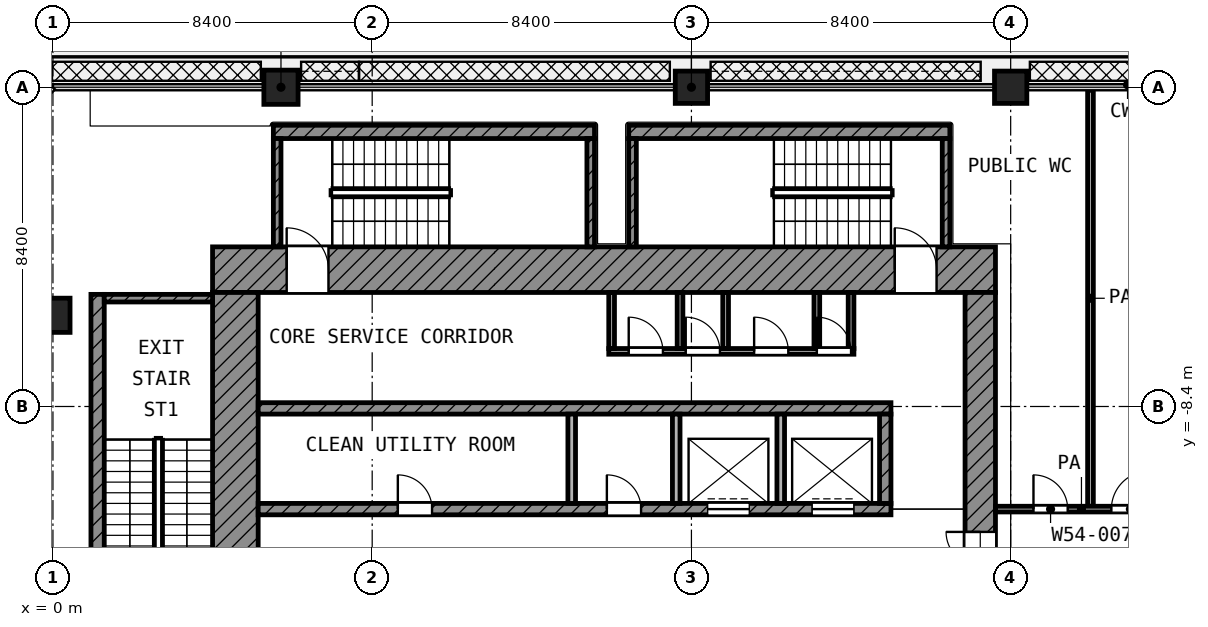
"""IFC4 building model, lengths in metres.
Left out: names, types, materials, properties, quantities, classifications, styles, units other than length and angle.
Written with IfcOpenShell. Run it as: python <this file> out.ifc"""

import sys

from ifc_helpers import new_model, si_unit, direction, frame, frame_2d, origin, origin_2d, place, context, subcontext, project, spatial, rectangle, extrude, element, fill, save


model = new_model("IFC4")
c1 = context("Model", 3, precision=1e-05, world=origin(), true_north=direction((0.0, 1.0)))
c2 = subcontext(c1, "Body", "Model", "MODEL_VIEW")
j1 = project(units=[si_unit("LENGTHUNIT", "METRE"), si_unit("PLANEANGLEUNIT", "RADIAN")], contexts=[c1])
p1 = place(None, origin())
s1 = spatial("IfcSite", under=j1, at=p1, CompositionType="ELEMENT")
p2 = place(p1, origin())
s2 = spatial("IfcBuilding", under=s1, at=p2, CompositionType="ELEMENT")
p3 = place(p2, frame((0.0, 0.0, 255.8)))
s3 = spatial("IfcBuildingStorey", under=s2, at=p3, CompositionType="ELEMENT", Elevation=255.8)
p4 = place(p3, frame((6.0, 0.0, 0.0), z_axis=(0.0, 0.0, 1.0), x_axis=(1.0, 0.0, 0.0)))
e1 = element("IfcColumn", 1, at=p4, inside=s3, PredefinedType="COLUMN", context=c2, shape_type="SweptSolid", body=[
    extrude(rectangle(XDim=0.9, YDim=0.9, at=origin_2d()), origin(), (0.0, 0.0, 1.0), 4.2),
])
for number, where, z_axis, x_axis in (
    (2, (16.8, 0.0, 0.0), (0.0, 0.0, 1.0), (1.0, 0.0, 0.0)),
    (3, (25.2, 0.0, 0.0), (0.0, 0.0, 1.0), (1.0, 0.0, 0.0)),
):
    element("IfcColumn", number, at=place(p3, frame(where, z_axis=z_axis, x_axis=x_axis)), inside=s3, PredefinedType="COLUMN", context=c2, shape_type="SweptSolid", body=[
        extrude(rectangle(XDim=0.85, YDim=0.85, at=origin_2d()), origin(), (0.0, 0.0, 1.0), 4.2),
    ])
p5 = place(p3, frame((0.0, -6.0, 0.0), z_axis=(0.0, 0.0, 1.0), x_axis=(1.0, 0.0, 0.0)))
e4 = element("IfcColumn", 4, at=p5, inside=s3, PredefinedType="COLUMN", context=c2, shape_type="SweptSolid", body=[
    extrude(rectangle(XDim=0.9, YDim=0.9, at=origin_2d()), origin(), (0.0, 0.0, 1.0), 4.2),
])
p6 = place(p3, frame((4.2, -4.8, 0.0), z_axis=(0.0, 0.0, 1.0), x_axis=(1.0, 0.0, 0.0)))
e5 = element("IfcWall", 5, at=p6, inside=s3, PredefinedType="SHEAR", context=c2, shape_type="SweptSolid", body=[
    extrude(rectangle(XDim=20.6, YDim=1.2, at=frame_2d((10.3, 0.0))), origin(), (0.0, 0.0, 1.0), 3.6),
])
p7 = place(p6, frame((1.95, 0.0, 0.0)))
e6 = element("IfcOpeningElement", 6, at=p7, cuts=e5, PredefinedType="OPENING", context=c2, shape_type="SweptSolid", body=[
    extrude(rectangle(XDim=1.1, YDim=2.1, at=frame_2d((0.55, 1.05))), frame((0.0, 0.61, 0.0), z_axis=(0.0, -1.0, 0.0), x_axis=(1.0, 0.0, 0.0)), (0.0, 0.0, 1.0), 1.22),
])
p8 = place(p6, frame((17.95, 0.0, 0.0)))
e7 = element("IfcOpeningElement", 7, at=p8, cuts=e5, PredefinedType="OPENING", context=c2, shape_type="SweptSolid", body=[
    extrude(rectangle(XDim=1.1, YDim=2.1, at=frame_2d((0.55, 1.05))), frame((0.0, 0.61, 0.0), z_axis=(0.0, -1.0, 0.0), x_axis=(1.0, 0.0, 0.0)), (0.0, 0.0, 1.0), 1.22),
])
p9 = place(p3, frame((4.8, -24.8, 0.0), z_axis=(0.0, 0.0, 1.0), x_axis=(0.0, 1.0, 0.0)))
e8 = element("IfcWall", 8, at=p9, inside=s3, PredefinedType="SHEAR", context=c2, shape_type="SweptSolid", body=[
    extrude(rectangle(XDim=19.4, YDim=1.2, at=frame_2d((9.7, 0.0))), origin(), (0.0, 0.0, 1.0), 3.6),
])
p10 = place(p9, frame((11.25, 0.0, 0.0)))
e9 = element("IfcOpeningElement", 9, at=p10, cuts=e8, PredefinedType="OPENING", context=c2, shape_type="SweptSolid", body=[
    extrude(rectangle(XDim=1.1, YDim=2.1, at=frame_2d((0.55, 1.05))), frame((0.0, 0.61, 0.0), z_axis=(0.0, -1.0, 0.0), x_axis=(1.0, 0.0, 0.0)), (0.0, 0.0, 1.0), 1.22),
])
p11 = place(p9, frame((1.95, 0.0, 0.0)))
e10 = element("IfcOpeningElement", 10, at=p11, cuts=e8, PredefinedType="OPENING", context=c2, shape_type="SweptSolid", body=[
    extrude(rectangle(XDim=1.1, YDim=2.1, at=frame_2d((0.55, 1.05))), frame((0.0, 0.61, 0.0), z_axis=(0.0, -1.0, 0.0), x_axis=(1.0, 0.0, 0.0)), (0.0, 0.0, 1.0), 1.22),
])
p12 = place(p3, frame((24.4, -24.0, 0.0), z_axis=(0.0, 0.0, 1.0), x_axis=(0.0, 1.0, 0.0)))
e11 = element("IfcWall", 11, at=p12, inside=s3, PredefinedType="SHEAR", context=c2, shape_type="SweptSolid", body=[
    extrude(rectangle(XDim=18.6, YDim=0.8, at=frame_2d((9.3, 0.0))), origin(), (0.0, 0.0, 1.0), 3.6),
])
p13 = place(p12, frame((10.5, 0.0, 0.0)))
e12 = element("IfcOpeningElement", 12, at=p13, cuts=e11, PredefinedType="OPENING", context=c2, shape_type="SweptSolid", body=[
    extrude(rectangle(XDim=1.8, YDim=2.1, at=frame_2d((0.9, 1.05))), frame((0.0, 0.41, 0.0), z_axis=(0.0, -1.0, 0.0), x_axis=(1.0, 0.0, 0.0)), (0.0, 0.0, 1.0), 0.82),
])
p14 = place(p3, frame((5.4, -8.45, 0.0), z_axis=(0.0, 0.0, 1.0), x_axis=(1.0, 0.0, 0.0)))
e13 = element("IfcWall", 13, at=p14, inside=s3, PredefinedType="SHEAR", context=c2, shape_type="SweptSolid", body=[
    extrude(rectangle(XDim=16.65, YDim=0.3, at=frame_2d((8.325, 0.0))), origin(), (0.0, 0.0, 1.0), 3.6),
])
p15 = place(p3, frame((5.4, -11.1, 0.0), z_axis=(0.0, 0.0, 1.0), x_axis=(1.0, 0.0, 0.0)))
e14 = element("IfcWall", 14, at=p15, inside=s3, PredefinedType="SHEAR", context=c2, shape_type="SweptSolid", body=[
    extrude(rectangle(XDim=16.65, YDim=0.3, at=frame_2d((8.325, 0.0))), origin(), (0.0, 0.0, 1.0), 3.6),
])
p16 = place(p15, frame((11.825, 0.0, 0.0)))
e15 = element("IfcOpeningElement", 15, at=p16, cuts=e14, PredefinedType="OPENING", context=c2, shape_type="SweptSolid", body=[
    extrude(rectangle(XDim=1.1, YDim=2.1, at=frame_2d((0.55, 1.05))), frame((0.0, 0.16, 0.0), z_axis=(0.0, -1.0, 0.0), x_axis=(1.0, 0.0, 0.0)), (0.0, 0.0, 1.0), 0.32),
])
p17 = place(p15, frame((14.575, 0.0, 0.0)))
e16 = element("IfcOpeningElement", 16, at=p17, cuts=e14, PredefinedType="OPENING", context=c2, shape_type="SweptSolid", body=[
    extrude(rectangle(XDim=1.1, YDim=2.1, at=frame_2d((0.55, 1.05))), frame((0.0, 0.16, 0.0), z_axis=(0.0, -1.0, 0.0), x_axis=(1.0, 0.0, 0.0)), (0.0, 0.0, 1.0), 0.32),
])
p18 = place(p15, frame((3.675, 0.0, 0.0)))
e17 = element("IfcOpeningElement", 17, at=p18, cuts=e14, PredefinedType="OPENING", context=c2, shape_type="SweptSolid", body=[
    extrude(rectangle(XDim=0.9, YDim=2.1, at=frame_2d((0.45, 1.05))), frame((0.0, 0.16, 0.0), z_axis=(0.0, -1.0, 0.0), x_axis=(1.0, 0.0, 0.0)), (0.0, 0.0, 1.0), 0.32),
])
p19 = place(p15, frame((9.175, 0.0, 0.0)))
e18 = element("IfcOpeningElement", 18, at=p19, cuts=e14, PredefinedType="OPENING", context=c2, shape_type="SweptSolid", body=[
    extrude(rectangle(XDim=0.9, YDim=2.1, at=frame_2d((0.45, 1.05))), frame((0.0, 0.16, 0.0), z_axis=(0.0, -1.0, 0.0), x_axis=(1.0, 0.0, 0.0)), (0.0, 0.0, 1.0), 0.32),
])
p20 = place(p3, frame((21.9, -10.95, 0.0), z_axis=(0.0, 0.0, 1.0), x_axis=(0.0, 1.0, 0.0)))
e19 = element("IfcWall", 19, at=p20, inside=s3, PredefinedType="SHEAR", context=c2, shape_type="SweptSolid", body=[
    extrude(rectangle(XDim=2.35, YDim=0.3, at=frame_2d((1.175, 0.0))), origin(), (0.0, 0.0, 1.0), 3.6),
])
for number, where, z_axis, x_axis in (
    (20, (13.65, -10.95, 0.0), (0.0, 0.0, 1.0), (0.0, 1.0, 0.0)),
    (21, (16.4, -10.95, 0.0), (0.0, 0.0, 1.0), (0.0, 1.0, 0.0)),
    (22, (19.15, -10.95, 0.0), (0.0, 0.0, 1.0), (0.0, 1.0, 0.0)),
):
    element("IfcWall", number, at=place(p3, frame(where, z_axis=z_axis, x_axis=x_axis)), inside=s3, PredefinedType="PARTITIONING", context=c2, shape_type="SweptSolid", body=[
        extrude(rectangle(XDim=2.35, YDim=0.2, at=frame_2d((1.175, 0.0))), origin(), (0.0, 0.0, 1.0), 3.6),
    ])
p21 = place(p3, frame((14.625, -6.95, 0.0), z_axis=(0.0, 0.0, 1.0), x_axis=(1.0, 0.0, 0.0)))
e23 = element("IfcWall", 23, at=p21, inside=s3, PredefinedType="PARTITIONING", context=c2, shape_type="SweptSolid", body=[
    extrude(rectangle(XDim=6.45, YDim=0.15, at=frame_2d((3.225, 0.0))), origin(), (0.0, 0.0, 1.0), 3.6),
])
p22 = place(p21, frame((0.525, 0.0, 0.0)))
e24 = element("IfcOpeningElement", 24, at=p22, cuts=e23, PredefinedType="OPENING", context=c2, shape_type="SweptSolid", body=[
    extrude(rectangle(XDim=0.9, YDim=2.1, at=frame_2d((0.45, 1.05))), frame((0.0, 0.085, 0.0), z_axis=(0.0, -1.0, 0.0), x_axis=(1.0, 0.0, 0.0)), (0.0, 0.0, 1.0), 0.17),
])
p23 = place(p21, frame((2.025, 0.0, 0.0)))
e25 = element("IfcOpeningElement", 25, at=p23, cuts=e23, PredefinedType="OPENING", context=c2, shape_type="SweptSolid", body=[
    extrude(rectangle(XDim=0.9, YDim=2.1, at=frame_2d((0.45, 1.05))), frame((0.0, 0.085, 0.0), z_axis=(0.0, -1.0, 0.0), x_axis=(1.0, 0.0, 0.0)), (0.0, 0.0, 1.0), 0.17),
])
p24 = place(p21, frame((3.825, 0.0, 0.0)))
e26 = element("IfcOpeningElement", 26, at=p24, cuts=e23, PredefinedType="OPENING", context=c2, shape_type="SweptSolid", body=[
    extrude(rectangle(XDim=0.9, YDim=2.1, at=frame_2d((0.45, 1.05))), frame((0.0, 0.085, 0.0), z_axis=(0.0, -1.0, 0.0), x_axis=(1.0, 0.0, 0.0)), (0.0, 0.0, 1.0), 0.17),
])
p25 = place(p21, frame((5.475, 0.0, 0.0)))
e27 = element("IfcOpeningElement", 27, at=p25, cuts=e23, PredefinedType="OPENING", context=c2, shape_type="SweptSolid", body=[
    extrude(rectangle(XDim=0.9, YDim=2.1, at=frame_2d((0.45, 1.05))), frame((0.0, 0.085, 0.0), z_axis=(0.0, -1.0, 0.0), x_axis=(1.0, 0.0, 0.0)), (0.0, 0.0, 1.0), 0.17),
])
for number, where, z_axis, x_axis in (
    (28, (14.7, -6.875, 0.0), (0.0, 0.0, 1.0), (0.0, 1.0, 0.0)),
    (29, (16.5, -6.875, 0.0), (0.0, 0.0, 1.0), (0.0, 1.0, 0.0)),
    (30, (17.7, -6.875, 0.0), (0.0, 0.0, 1.0), (0.0, 1.0, 0.0)),
    (31, (20.1, -6.875, 0.0), (0.0, 0.0, 1.0), (0.0, 1.0, 0.0)),
    (32, (21.0, -6.875, 0.0), (0.0, 0.0, 1.0), (0.0, 1.0, 0.0)),
):
    element("IfcWall", number, at=place(p3, frame(where, z_axis=z_axis, x_axis=x_axis)), inside=s3, PredefinedType="PARTITIONING", context=c2, shape_type="SweptSolid", body=[
        extrude(rectangle(XDim=1.475, YDim=0.15, at=frame_2d((0.738, 0.0))), origin(), (0.0, 0.0, 1.0), 3.6),
    ])
p26 = place(p3, frame((1.175, -13.9, 0.0), z_axis=(0.0, 0.0, 1.0), x_axis=(0.0, 1.0, 0.0)))
e33 = element("IfcWall", 33, at=p26, inside=s3, PredefinedType="SHEAR", context=c2, shape_type="SweptSolid", body=[
    extrude(rectangle(XDim=8.45, YDim=0.35, at=frame_2d((4.225, 0.0))), origin(), (0.0, 0.0, 1.0), 3.6),
])
p27 = place(p3, frame((1.35, -5.55, 0.0), z_axis=(0.0, 0.0, 1.0), x_axis=(1.0, 0.0, 0.0)))
e34 = element("IfcWall", 34, at=p27, inside=s3, PredefinedType="SHEAR", context=c2, shape_type="SweptSolid", body=[
    extrude(rectangle(XDim=2.85, YDim=0.2, at=frame_2d((1.425, 0.0))), origin(), (0.0, 0.0, 1.0), 3.6),
])
p28 = place(p3, frame((5.8, -1.175, 0.0), z_axis=(0.0, 0.0, 1.0), x_axis=(1.0, 0.0, 0.0)))
e35 = element("IfcWall", 35, at=p28, inside=s3, PredefinedType="SHEAR", context=c2, shape_type="SweptSolid", body=[
    extrude(rectangle(XDim=8.45, YDim=0.35, at=frame_2d((4.225, 0.0))), origin(), (0.0, 0.0, 1.0), 3.6),
])
for number, where, z_axis, x_axis in (
    (36, (5.9, -4.2, 0.0), (0.0, 0.0, 1.0), (0.0, 1.0, 0.0)),
    (37, (14.15, -4.2, 0.0), (0.0, 0.0, 1.0), (0.0, 1.0, 0.0)),
):
    element("IfcWall", number, at=place(p3, frame(where, z_axis=z_axis, x_axis=x_axis)), inside=s3, PredefinedType="SHEAR", context=c2, shape_type="SweptSolid", body=[
        extrude(rectangle(XDim=2.85, YDim=0.2, at=frame_2d((1.425, 0.0))), origin(), (0.0, 0.0, 1.0), 3.6),
    ])
p29 = place(p3, frame((15.15, -1.175, 0.0), z_axis=(0.0, 0.0, 1.0), x_axis=(1.0, 0.0, 0.0)))
e38 = element("IfcWall", 38, at=p29, inside=s3, PredefinedType="SHEAR", context=c2, shape_type="SweptSolid", body=[
    extrude(rectangle(XDim=8.45, YDim=0.35, at=frame_2d((4.225, 0.0))), origin(), (0.0, 0.0, 1.0), 3.6),
])
for number, where, z_axis, x_axis in (
    (39, (15.25, -4.2, 0.0), (0.0, 0.0, 1.0), (0.0, 1.0, 0.0)),
    (40, (23.5, -4.2, 0.0), (0.0, 0.0, 1.0), (0.0, 1.0, 0.0)),
):
    element("IfcWall", number, at=place(p3, frame(where, z_axis=z_axis, x_axis=x_axis)), inside=s3, PredefinedType="SHEAR", context=c2, shape_type="SweptSolid", body=[
        extrude(rectangle(XDim=2.85, YDim=0.2, at=frame_2d((1.425, 0.0))), origin(), (0.0, 0.0, 1.0), 3.6),
    ])
p30 = place(p3, frame((24.8, -11.1, 0.0), z_axis=(0.0, 0.0, 1.0), x_axis=(1.0, 0.0, 0.0)))
e41 = element("IfcWall", 41, at=p30, inside=s3, PredefinedType="PARTITIONING", context=c2, shape_type="SweptSolid", body=[
    extrude(rectangle(XDim=4.525, YDim=0.15, at=frame_2d((2.262, 0.0))), origin(), (0.0, 0.0, 1.0), 3.6),
])
p31 = place(p30, frame((1.0, 0.0, 0.0)))
e42 = element("IfcOpeningElement", 42, at=p31, cuts=e41, PredefinedType="OPENING", context=c2, shape_type="SweptSolid", body=[
    extrude(rectangle(XDim=0.9, YDim=2.1, at=frame_2d((0.45, 1.05))), frame((0.0, 0.085, 0.0), z_axis=(0.0, -1.0, 0.0), x_axis=(1.0, 0.0, 0.0)), (0.0, 0.0, 1.0), 0.17),
])
p32 = place(p30, frame((3.05, 0.0, 0.0)))
e43 = element("IfcOpeningElement", 43, at=p32, cuts=e41, PredefinedType="OPENING", context=c2, shape_type="SweptSolid", body=[
    extrude(rectangle(XDim=1.0, YDim=2.1, at=frame_2d((0.5, 1.05))), frame((0.0, 0.085, 0.0), z_axis=(0.0, -1.0, 0.0), x_axis=(1.0, 0.0, 0.0)), (0.0, 0.0, 1.0), 0.17),
])
p33 = place(p3, frame((27.3, -11.025, 0.0), z_axis=(0.0, 0.0, 1.0), x_axis=(0.0, 1.0, 0.0)))
e44 = element("IfcWall", 44, at=p33, inside=s3, PredefinedType="PARTITIONING", context=c2, shape_type="SweptSolid", body=[
    extrude(rectangle(XDim=10.945, YDim=0.15, at=frame_2d((5.472, 0.0))), origin(), (0.0, 0.0, 1.0), 3.6),
])
p34 = place(p16, origin())
e45 = element("IfcDoor", 45, at=p34, inside=s3, OperationType="DOUBLE_DOOR_SLIDING", PredefinedType="DOOR", context=c2, shape_type="SweptSolid", body=[
    extrude(rectangle(XDim=1.1, YDim=2.1, at=frame_2d((0.55, 1.05))), frame((0.0, 0.025, 0.0), z_axis=(0.0, -1.0, 0.0), x_axis=(1.0, 0.0, 0.0)), (0.0, 0.0, 1.0), 0.05),
])
fill(e15, e45)
p35 = place(p17, origin())
e46 = element("IfcDoor", 46, at=p35, inside=s3, OperationType="DOUBLE_DOOR_SLIDING", PredefinedType="DOOR", context=c2, shape_type="SweptSolid", body=[
    extrude(rectangle(XDim=1.1, YDim=2.1, at=frame_2d((0.55, 1.05))), frame((0.0, 0.025, 0.0), z_axis=(0.0, -1.0, 0.0), x_axis=(1.0, 0.0, 0.0)), (0.0, 0.0, 1.0), 0.05),
])
fill(e16, e46)
p36 = place(p7, origin())
e47 = element("IfcDoor", 47, at=p36, inside=s3, OperationType="SINGLE_SWING_LEFT", PredefinedType="DOOR", context=c2, shape_type="SweptSolid", body=[
    extrude(rectangle(XDim=1.1, YDim=2.1, at=frame_2d((0.55, 1.05))), frame((0.0, 0.025, 0.0), z_axis=(0.0, -1.0, 0.0), x_axis=(1.0, 0.0, 0.0)), (0.0, 0.0, 1.0), 0.05),
])
fill(e6, e47)
p37 = place(p8, origin())
e48 = element("IfcDoor", 48, at=p37, inside=s3, OperationType="SINGLE_SWING_LEFT", PredefinedType="DOOR", context=c2, shape_type="SweptSolid", body=[
    extrude(rectangle(XDim=1.1, YDim=2.1, at=frame_2d((0.55, 1.05))), frame((0.0, 0.025, 0.0), z_axis=(0.0, -1.0, 0.0), x_axis=(1.0, 0.0, 0.0)), (0.0, 0.0, 1.0), 0.05),
])
fill(e7, e48)
p38 = place(p13, origin())
e49 = element("IfcDoor", 49, at=p38, inside=s3, OperationType="DOUBLE_DOOR_SINGLE_SWING", PredefinedType="DOOR", context=c2, shape_type="SweptSolid", body=[
    extrude(rectangle(XDim=1.8, YDim=2.1, at=frame_2d((0.9, 1.05))), frame((0.0, 0.025, 0.0), z_axis=(0.0, -1.0, 0.0), x_axis=(1.0, 0.0, 0.0)), (0.0, 0.0, 1.0), 0.05),
])
fill(e12, e49)
p39 = place(p22, origin())
e50 = element("IfcDoor", 50, at=p39, inside=s3, OperationType="SINGLE_SWING_LEFT", PredefinedType="DOOR", context=c2, shape_type="SweptSolid", body=[
    extrude(rectangle(XDim=0.9, YDim=2.1, at=frame_2d((0.45, 1.05))), frame((0.0, 0.025, 0.0), z_axis=(0.0, -1.0, 0.0), x_axis=(1.0, 0.0, 0.0)), (0.0, 0.0, 1.0), 0.05),
])
fill(e24, e50)
p40 = place(p23, origin())
e51 = element("IfcDoor", 51, at=p40, inside=s3, OperationType="SINGLE_SWING_LEFT", PredefinedType="DOOR", context=c2, shape_type="SweptSolid", body=[
    extrude(rectangle(XDim=0.9, YDim=2.1, at=frame_2d((0.45, 1.05))), frame((0.0, 0.025, 0.0), z_axis=(0.0, -1.0, 0.0), x_axis=(1.0, 0.0, 0.0)), (0.0, 0.0, 1.0), 0.05),
])
fill(e25, e51)
p41 = place(p24, origin())
e52 = element("IfcDoor", 52, at=p41, inside=s3, OperationType="SINGLE_SWING_LEFT", PredefinedType="DOOR", context=c2, shape_type="SweptSolid", body=[
    extrude(rectangle(XDim=0.9, YDim=2.1, at=frame_2d((0.45, 1.05))), frame((0.0, 0.025, 0.0), z_axis=(0.0, -1.0, 0.0), x_axis=(1.0, 0.0, 0.0)), (0.0, 0.0, 1.0), 0.05),
])
fill(e26, e52)
p42 = place(p25, origin())
e53 = element("IfcDoor", 53, at=p42, inside=s3, OperationType="SINGLE_SWING_LEFT", PredefinedType="DOOR", context=c2, shape_type="SweptSolid", body=[
    extrude(rectangle(XDim=0.9, YDim=2.1, at=frame_2d((0.45, 1.05))), frame((0.0, 0.025, 0.0), z_axis=(0.0, -1.0, 0.0), x_axis=(1.0, 0.0, 0.0)), (0.0, 0.0, 1.0), 0.05),
])
fill(e27, e53)
p43 = place(p18, origin())
e54 = element("IfcDoor", 54, at=p43, inside=s3, OperationType="SINGLE_SWING_LEFT", PredefinedType="DOOR", context=c2, shape_type="SweptSolid", body=[
    extrude(rectangle(XDim=0.9, YDim=2.1, at=frame_2d((0.45, 1.05))), frame((0.0, 0.025, 0.0), z_axis=(0.0, -1.0, 0.0), x_axis=(1.0, 0.0, 0.0)), (0.0, 0.0, 1.0), 0.05),
])
fill(e17, e54)
p44 = place(p19, origin())
e55 = element("IfcDoor", 55, at=p44, inside=s3, OperationType="SINGLE_SWING_LEFT", PredefinedType="DOOR", context=c2, shape_type="SweptSolid", body=[
    extrude(rectangle(XDim=0.9, YDim=2.1, at=frame_2d((0.45, 1.05))), frame((0.0, 0.025, 0.0), z_axis=(0.0, -1.0, 0.0), x_axis=(1.0, 0.0, 0.0)), (0.0, 0.0, 1.0), 0.05),
])
fill(e18, e55)
p45 = place(p31, origin())
e56 = element("IfcDoor", 56, at=p45, inside=s3, OperationType="SINGLE_SWING_LEFT", PredefinedType="DOOR", context=c2, shape_type="SweptSolid", body=[
    extrude(rectangle(XDim=0.9, YDim=2.1, at=frame_2d((0.45, 1.05))), frame((0.0, 0.025, 0.0), z_axis=(0.0, -1.0, 0.0), x_axis=(1.0, 0.0, 0.0)), (0.0, 0.0, 1.0), 0.05),
])
fill(e42, e56)
p46 = place(p32, origin())
e57 = element("IfcDoor", 57, at=p46, inside=s3, OperationType="SINGLE_SWING_RIGHT", PredefinedType="DOOR", context=c2, shape_type="SweptSolid", body=[
    extrude(rectangle(XDim=1.0, YDim=2.1, at=frame_2d((0.5, 1.05))), frame((0.0, 0.025, 0.0), z_axis=(0.0, -1.0, 0.0), x_axis=(1.0, 0.0, 0.0)), (0.0, 0.0, 1.0), 0.05),
])
fill(e43, e57)
save(model, sys.argv[1])
